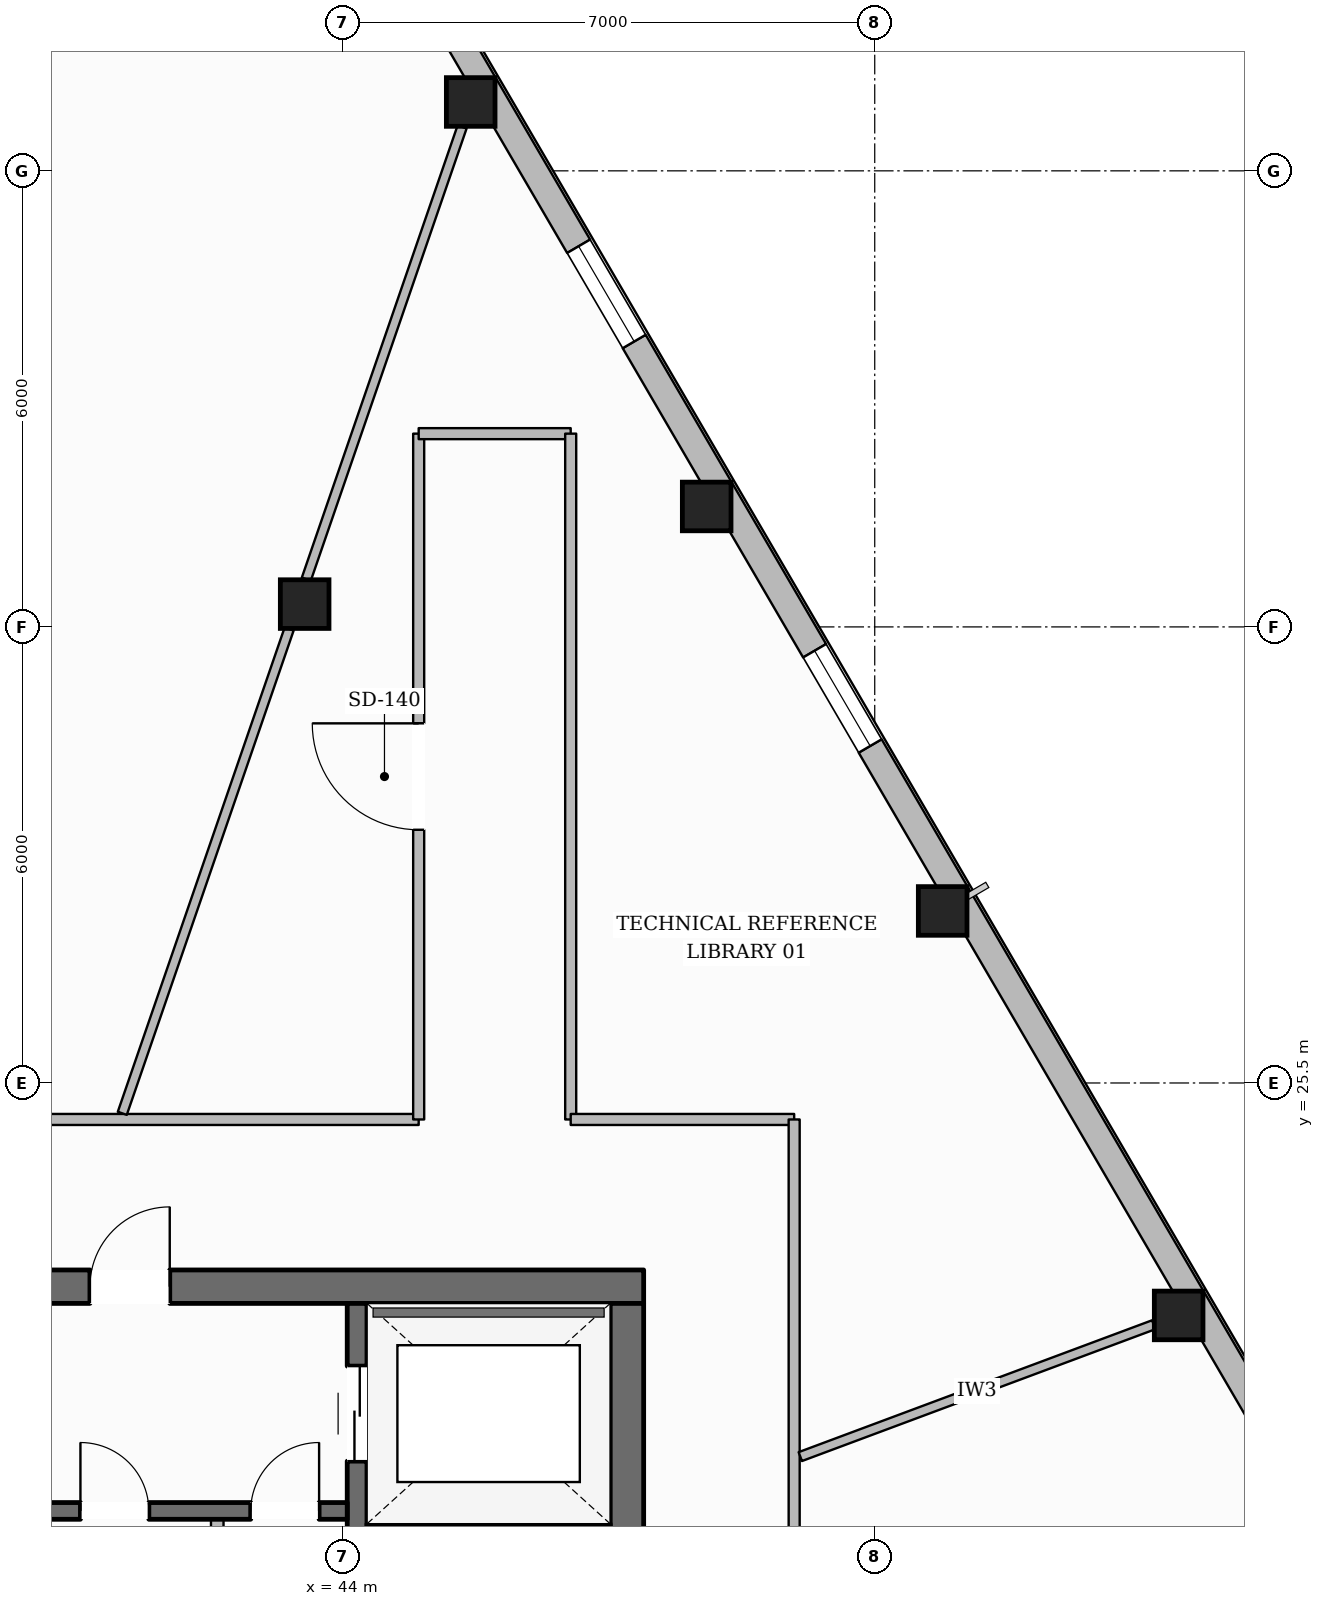
"""IFC4 building model, lengths in metres.
Left out: names, types, materials, properties, quantities, classifications, styles, units other than length and angle.
Written with IfcOpenShell. Run it as: python <this file> out.ifc"""

import sys

from ifc_helpers import new_model, si_unit, direction, frame, frame_2d, origin, origin_2d, place, context, subcontext, project, spatial, rectangle, hollow_rectangle, extrude, element, fill, save


model = new_model("IFC4")
c1 = context("Model", 3, precision=1e-05, world=origin(), true_north=direction((0.0, 1.0)))
c2 = subcontext(c1, "Body", "Model", "MODEL_VIEW")
j1 = project(units=[si_unit("LENGTHUNIT", "METRE"), si_unit("PLANEANGLEUNIT", "RADIAN")], contexts=[c1])
p1 = place(None, origin())
s1 = spatial("IfcSite", under=j1, at=p1, CompositionType="ELEMENT")
p2 = place(p1, origin())
s2 = spatial("IfcBuilding", under=s1, at=p2, CompositionType="ELEMENT")
p3 = place(p2, frame((0.0, 0.0, 184.25)))
s3 = spatial("IfcBuildingStorey", under=s2, at=p3, CompositionType="ELEMENT", Elevation=184.25)
p4 = place(p3, frame((28.04, 22.82, 0.0), z_axis=(0.0, 0.0, 1.0), x_axis=(1.0, 0.0, 0.0)))
e1 = element("IfcWall", 1, at=p4, inside=s3, PredefinedType="SOLIDWALL", context=c2, shape_type="SweptSolid", body=[
    extrude(rectangle(XDim=19.92, YDim=0.44, at=frame_2d((9.96, 0.0))), origin(), (0.0, 0.0, 1.0), 3.6),
])
p5 = place(p4, frame((6.235, 0.0, 0.0)))
e2 = element("IfcOpeningElement", 2, at=p5, cuts=e1, PredefinedType="OPENING", context=c2, shape_type="SweptSolid", body=[
    extrude(rectangle(XDim=1.05, YDim=2.15, at=frame_2d((0.525, 1.075))), frame((0.0, 0.23, 0.0), z_axis=(0.0, -1.0, 0.0), x_axis=(1.0, 0.0, 0.0)), (0.0, 0.0, 1.0), 0.46),
])
p6 = place(p4, frame((12.635, 0.0, 0.0)))
e3 = element("IfcOpeningElement", 3, at=p6, cuts=e1, PredefinedType="OPENING", context=c2, shape_type="SweptSolid", body=[
    extrude(rectangle(XDim=1.05, YDim=2.15, at=frame_2d((0.525, 1.075))), frame((0.0, 0.23, 0.0), z_axis=(0.0, -1.0, 0.0), x_axis=(1.0, 0.0, 0.0)), (0.0, 0.0, 1.0), 0.46),
])
p7 = place(p3, frame((47.74, 9.6, 0.0), z_axis=(0.0, 0.0, 1.0), x_axis=(0.0, 1.0, 0.0)))
e4 = element("IfcWall", 4, at=p7, inside=s3, PredefinedType="SOLIDWALL", context=c2, shape_type="SweptSolid", body=[
    extrude(rectangle(XDim=13.0, YDim=0.44, at=frame_2d((6.5, 0.0))), origin(), (0.0, 0.0, 1.0), 3.6),
])
p8 = place(p7, frame((0.2, 0.0, 0.0)))
e5 = element("IfcOpeningElement", 5, at=p8, cuts=e4, PredefinedType="OPENING", context=c2, shape_type="SweptSolid", body=[
    extrude(rectangle(XDim=1.1, YDim=2.15, at=frame_2d((0.55, 1.075))), frame((0.0, 0.23, 0.0), z_axis=(0.0, -1.0, 0.0), x_axis=(1.0, 0.0, 0.0)), (0.0, 0.0, 1.0), 0.46),
])
p9 = place(p7, frame((8.4, 0.0, 0.0)))
e6 = element("IfcOpeningElement", 6, at=p9, cuts=e4, PredefinedType="OPENING", context=c2, shape_type="SweptSolid", body=[
    extrude(rectangle(XDim=0.9, YDim=2.1, at=frame_2d((0.45, 1.05))), frame((0.0, 0.23, 0.0), z_axis=(0.0, -1.0, 0.0), x_axis=(1.0, 0.0, 0.0)), (0.0, 0.0, 1.0), 0.46),
])
p10 = place(p3, frame((44.19, 9.6, 0.0), z_axis=(0.0, 0.0, 1.0), x_axis=(0.0, 1.0, 0.0)))
e7 = element("IfcWall", 7, at=p10, inside=s3, PredefinedType="SHEAR", context=c2, shape_type="SweptSolid", body=[
    extrude(rectangle(XDim=13.0, YDim=0.26, at=frame_2d((6.5, 0.0))), origin(), (0.0, 0.0, 1.0), 3.6),
])
p11 = place(p10, frame((10.925, 0.0, 0.0)))
e8 = element("IfcOpeningElement", 8, at=p11, cuts=e7, PredefinedType="OPENING", context=c2, shape_type="SweptSolid", body=[
    extrude(rectangle(XDim=1.25, YDim=2.25, at=frame_2d((0.625, 1.125))), frame((0.0, 0.14, 0.0), z_axis=(0.0, -1.0, 0.0), x_axis=(1.0, 0.0, 0.0)), (0.0, 0.0, 1.0), 0.28),
])
p12 = place(p3, frame((44.32, 19.57, 0.0), z_axis=(0.0, 0.0, 1.0), x_axis=(1.0, 0.0, 0.0)))
e9 = element("IfcWall", 9, at=p12, inside=s3, PredefinedType="SHEAR", context=c2, shape_type="SweptSolid", body=[
    extrude(rectangle(XDim=3.2, YDim=0.26, at=frame_2d((1.6, 0.0))), origin(), (0.0, 0.0, 1.0), 3.6),
])
p13 = place(p3, frame((31.94, 19.87, 0.0), z_axis=(0.0, 0.0, 1.0), x_axis=(1.0, 0.0, 0.0)))
e10 = element("IfcWall", 10, at=p13, inside=s3, PredefinedType="SOLIDWALL", context=c2, shape_type="SweptSolid", body=[
    extrude(rectangle(XDim=12.12, YDim=0.22, at=frame_2d((6.06, 0.0))), origin(), (0.0, 0.0, 1.0), 3.6),
])
p14 = place(p13, frame((6.3, 0.0, 0.0)))
e11 = element("IfcOpeningElement", 11, at=p14, cuts=e10, PredefinedType="OPENING", context=c2, shape_type="SweptSolid", body=[
    extrude(rectangle(XDim=1.1, YDim=2.15, at=frame_2d((0.55, 1.075))), frame((0.0, 0.12, 0.0), z_axis=(0.0, -1.0, 0.0), x_axis=(1.0, 0.0, 0.0)), (0.0, 0.0, 1.0), 0.24),
])
p15 = place(p13, frame((8.61, 0.0, 0.0)))
e12 = element("IfcOpeningElement", 12, at=p15, cuts=e10, PredefinedType="OPENING", context=c2, shape_type="SweptSolid", body=[
    extrude(rectangle(XDim=0.9, YDim=2.1, at=frame_2d((0.45, 1.05))), frame((0.0, 0.12, 0.0), z_axis=(0.0, -1.0, 0.0), x_axis=(1.0, 0.0, 0.0)), (0.0, 0.0, 1.0), 0.24),
])
p16 = place(p13, frame((10.85, 0.0, 0.0)))
e13 = element("IfcOpeningElement", 13, at=p16, cuts=e10, PredefinedType="OPENING", context=c2, shape_type="SweptSolid", body=[
    extrude(rectangle(XDim=0.9, YDim=2.1, at=frame_2d((0.45, 1.05))), frame((0.0, 0.12, 0.0), z_axis=(0.0, -1.0, 0.0), x_axis=(1.0, 0.0, 0.0)), (0.0, 0.0, 1.0), 0.24),
])
for number, where, z_axis, x_axis in (
    (14, (54.998, 22.442, 0.0), (0.0, 0.0, 1.0), (1.0, 0.0, 0.0)),
    (15, (51.894, 27.763, 0.0), (0.0, 0.0, 1.0), (1.0, 0.0, 0.0)),
    (16, (48.789, 33.085, 0.0), (0.0, 0.0, 1.0), (1.0, 0.0, 0.0)),
    (17, (45.684, 38.406, 0.0), (0.0, 0.0, 1.0), (1.0, 0.0, 0.0)),
    (18, (43.5, 31.8, 0.0), (0.0, 0.0, 1.0), (1.0, 0.0, 0.0)),
):
    element("IfcColumn", number, at=place(p3, frame(where, z_axis=z_axis, x_axis=x_axis)), inside=s3, PredefinedType="COLUMN", context=c2, shape_type="SweptSolid", body=[
        extrude(hollow_rectangle(XDim=0.64, YDim=0.64, WallThickness=0.028, at=origin_2d()), origin(), (0.0, 0.0, 1.0), 3.6),
    ])
p17 = place(p3, frame((42.575, 44.272, 0.0), z_axis=(0.0, 0.0, 1.0), x_axis=(0.503934681705, -0.863741764982, 0.0)))
e19 = element("IfcWall", 19, at=p17, inside=s3, PredefinedType="STANDARD", context=c2, shape_type="SweptSolid", body=[
    extrude(rectangle(XDim=37.915, YDim=0.35, at=frame_2d((18.958, 0.0))), origin(), (0.0, 0.0, 1.0), 3.132),
])
p18 = place(p17, frame((33.633, 0.0, 0.65)))
e20 = element("IfcOpeningElement", 20, at=p18, cuts=e19, PredefinedType="OPENING", context=c2, shape_type="SweptSolid", body=[
    extrude(rectangle(XDim=1.45, YDim=1.75, at=frame_2d((0.725, 0.875))), frame((0.0, 0.185, 0.0), z_axis=(0.0, -1.0, 0.0), x_axis=(1.0, 0.0, 0.0)), (0.0, 0.0, 1.0), 0.37),
])
p19 = place(p17, frame((27.472, 0.0, 0.65)))
e21 = element("IfcOpeningElement", 21, at=p19, cuts=e19, PredefinedType="OPENING", context=c2, shape_type="SweptSolid", body=[
    extrude(rectangle(XDim=1.45, YDim=1.75, at=frame_2d((0.725, 0.875))), frame((0.0, 0.185, 0.0), z_axis=(0.0, -1.0, 0.0), x_axis=(1.0, 0.0, 0.0)), (0.0, 0.0, 1.0), 0.37),
])
p20 = place(p17, frame((15.15, 0.0, 0.65)))
e22 = element("IfcOpeningElement", 22, at=p20, cuts=e19, PredefinedType="OPENING", context=c2, shape_type="SweptSolid", body=[
    extrude(rectangle(XDim=1.45, YDim=1.75, at=frame_2d((0.725, 0.875))), frame((0.0, 0.185, 0.0), z_axis=(0.0, -1.0, 0.0), x_axis=(1.0, 0.0, 0.0)), (0.0, 0.0, 1.0), 0.37),
])
p21 = place(p17, frame((8.989, 0.0, 0.65)))
e23 = element("IfcOpeningElement", 23, at=p21, cuts=e19, PredefinedType="OPENING", context=c2, shape_type="SweptSolid", body=[
    extrude(rectangle(XDim=1.45, YDim=1.75, at=frame_2d((0.725, 0.875))), frame((0.0, 0.185, 0.0), z_axis=(0.0, -1.0, 0.0), x_axis=(1.0, 0.0, 0.0)), (0.0, 0.0, 1.0), 0.37),
])
p22 = place(p17, frame((2.828, 0.0, 0.65)))
e24 = element("IfcOpeningElement", 24, at=p22, cuts=e19, PredefinedType="OPENING", context=c2, shape_type="SweptSolid", body=[
    extrude(rectangle(XDim=1.45, YDim=1.75, at=frame_2d((0.725, 0.875))), frame((0.0, 0.185, 0.0), z_axis=(0.0, -1.0, 0.0), x_axis=(1.0, 0.0, 0.0)), (0.0, 0.0, 1.0), 0.37),
])
p23 = place(p3, frame((42.35, 16.56, 0.0), z_axis=(0.0, 0.0, 1.0), x_axis=(0.0, 1.0, 0.0)))
e25 = element("IfcWall", 25, at=p23, inside=s3, PredefinedType="PARTITIONING", context=c2, shape_type="SweptSolid", body=[
    extrude(rectangle(XDim=3.2, YDim=0.165, at=frame_2d((1.6, 0.0))), origin(), (0.0, 0.0, 1.0), 3.6),
])
p24 = place(p3, frame((31.0, 25.02, 0.0), z_axis=(0.0, 0.0, 1.0), x_axis=(1.0, 0.0, 0.0)))
e26 = element("IfcWall", 26, at=p24, inside=s3, PredefinedType="PARTITIONING", context=c2, shape_type="SweptSolid", body=[
    extrude(rectangle(XDim=14.0, YDim=0.145, at=frame_2d((7.0, 0.0))), origin(), (0.0, 0.0, 1.0), 3.6),
])
p25 = place(p24, frame((4.434, 0.0, 0.0)))
e27 = element("IfcOpeningElement", 27, at=p25, cuts=e26, PredefinedType="OPENING", context=c2, shape_type="SweptSolid", body=[
    extrude(rectangle(XDim=1.4, YDim=2.2, at=frame_2d((0.7, 1.1))), frame((0.0, 0.083, 0.0), z_axis=(0.0, -1.0, 0.0), x_axis=(1.0, 0.0, 0.0)), (0.0, 0.0, 1.0), 0.165),
])
p26 = place(p3, frame((45.0, 25.02, 0.0), z_axis=(0.0, 0.0, 1.0), x_axis=(0.0, 1.0, 0.0)))
e28 = element("IfcWall", 28, at=p26, inside=s3, PredefinedType="PARTITIONING", context=c2, shape_type="SweptSolid", body=[
    extrude(rectangle(XDim=9.022, YDim=0.145, at=frame_2d((4.511, 0.0))), origin(), (0.0, 0.0, 1.0), 3.6),
])
p27 = place(p26, frame((3.811, 0.0, 0.0)))
e29 = element("IfcOpeningElement", 29, at=p27, cuts=e28, PredefinedType="OPENING", context=c2, shape_type="SweptSolid", body=[
    extrude(rectangle(XDim=1.4, YDim=2.2, at=frame_2d((0.7, 1.1))), frame((0.0, 0.083, 0.0), z_axis=(0.0, -1.0, 0.0), x_axis=(1.0, 0.0, 0.0)), (0.0, 0.0, 1.0), 0.165),
])
p28 = place(p3, frame((45.0, 34.042, 0.0), z_axis=(0.0, 0.0, 1.0), x_axis=(1.0, 0.0, 0.0)))
e30 = element("IfcWall", 30, at=p28, inside=s3, PredefinedType="PARTITIONING", context=c2, shape_type="SweptSolid", body=[
    extrude(rectangle(XDim=2.0, YDim=0.145, at=frame_2d((1.0, 0.0))), origin(), (0.0, 0.0, 1.0), 3.6),
])
p29 = place(p3, frame((47.0, 34.042, 0.0), z_axis=(0.0, 0.0, 1.0), x_axis=(0.0, -1.0, 0.0)))
e31 = element("IfcWall", 31, at=p29, inside=s3, PredefinedType="PARTITIONING", context=c2, shape_type="SweptSolid", body=[
    extrude(rectangle(XDim=9.022, YDim=0.145, at=frame_2d((4.511, 0.0))), origin(), (0.0, 0.0, 1.0), 3.6),
])
p30 = place(p3, frame((47.0, 25.02, 0.0), z_axis=(0.0, 0.0, 1.0), x_axis=(1.0, 0.0, 0.0)))
e32 = element("IfcWall", 32, at=p30, inside=s3, PredefinedType="PARTITIONING", context=c2, shape_type="SweptSolid", body=[
    extrude(rectangle(XDim=2.94, YDim=0.145, at=frame_2d((1.47, 0.0))), origin(), (0.0, 0.0, 1.0), 3.6),
])
p31 = place(p3, frame((49.94, 25.02, 0.0), z_axis=(0.0, 0.0, 1.0), x_axis=(0.0, -1.0, 0.0)))
e33 = element("IfcWall", 33, at=p31, inside=s3, PredefinedType="PARTITIONING", context=c2, shape_type="SweptSolid", body=[
    extrude(rectangle(XDim=7.92, YDim=0.145, at=frame_2d((3.96, 0.0))), origin(), (0.0, 0.0, 1.0), 3.339),
])
p32 = place(p3, frame((50.021, 20.585, 0.0), z_axis=(0.0, 0.0, 1.0), x_axis=(0.936930245376, 0.349516402047, 0.0)))
e34 = element("IfcWall", 34, at=p32, inside=s3, PredefinedType="PARTITIONING", context=c2, shape_type="SweptSolid", body=[
    extrude(rectangle(XDim=4.963, YDim=0.125, at=frame_2d((2.481, 0.0))), origin(), (0.0, 0.0, 1.0), 3.6),
])
p33 = place(p3, frame((41.101, 25.101, 0.0), z_axis=(0.0, 0.0, 1.0), x_axis=(0.325732757855, 0.945461882077, 0.0)))
e35 = element("IfcWall", 35, at=p33, inside=s3, PredefinedType="PARTITIONING", context=c2, shape_type="SweptSolid", body=[
    extrude(rectangle(XDim=6.739, YDim=0.125, at=frame_2d((3.369, 0.0))), origin(), (0.0, 0.0, 1.0), 3.141),
])
p34 = place(p3, frame((43.521, 32.128, 0.0), z_axis=(0.0, 0.0, 1.0), x_axis=(0.325720467461, 0.945466116303, 0.0)))
e36 = element("IfcWall", 36, at=p34, inside=s3, PredefinedType="PARTITIONING", context=c2, shape_type="SweptSolid", body=[
    extrude(rectangle(XDim=6.293, YDim=0.125, at=frame_2d((3.146, 0.0))), origin(), (0.0, 0.0, 1.0), 3.6),
])
p35 = place(p20, origin())
e37 = element("IfcWindow", 37, at=p35, inside=s3, PartitioningType="SINGLE_PANEL", PredefinedType="WINDOW", context=c2, shape_type="SweptSolid", body=[
    extrude(rectangle(XDim=1.45, YDim=1.75, at=frame_2d((0.725, 0.875))), frame((0.0, 0.03, 0.0), z_axis=(0.0, -1.0, 0.0), x_axis=(1.0, 0.0, 0.0)), (0.0, 0.0, 1.0), 0.06),
])
fill(e22, e37)
p36 = place(p21, origin())
e38 = element("IfcWindow", 38, at=p36, inside=s3, PartitioningType="SINGLE_PANEL", PredefinedType="WINDOW", context=c2, shape_type="SweptSolid", body=[
    extrude(rectangle(XDim=1.45, YDim=1.75, at=frame_2d((0.725, 0.875))), frame((0.0, 0.03, 0.0), z_axis=(0.0, -1.0, 0.0), x_axis=(1.0, 0.0, 0.0)), (0.0, 0.0, 1.0), 0.06),
])
fill(e23, e38)
p37 = place(p6, origin())
e39 = element("IfcDoor", 39, at=p37, inside=s3, OperationType="SINGLE_SWING_RIGHT", PredefinedType="DOOR", context=c2, shape_type="SweptSolid", body=[
    extrude(rectangle(XDim=1.05, YDim=2.15, at=frame_2d((0.525, 1.075))), frame((0.0, 0.025, 0.0), z_axis=(0.0, -1.0, 0.0), x_axis=(1.0, 0.0, 0.0)), (0.0, 0.0, 1.0), 0.05),
])
fill(e3, e39)
p38 = place(p11, origin())
e40 = element("IfcDoor", 40, at=p38, inside=s3, OperationType="DOUBLE_DOOR_SLIDING", PredefinedType="DOOR", context=c2, shape_type="SweptSolid", body=[
    extrude(rectangle(XDim=1.25, YDim=2.25, at=frame_2d((0.625, 1.125))), frame((0.0, 0.025, 0.0), z_axis=(0.0, -1.0, 0.0), x_axis=(1.0, 0.0, 0.0)), (0.0, 0.0, 1.0), 0.05),
])
fill(e8, e40)
p39 = place(p15, origin())
e41 = element("IfcDoor", 41, at=p39, inside=s3, OperationType="SINGLE_SWING_LEFT", PredefinedType="DOOR", context=c2, shape_type="SweptSolid", body=[
    extrude(rectangle(XDim=0.9, YDim=2.1, at=frame_2d((0.45, 1.05))), frame((0.0, 0.025, 0.0), z_axis=(0.0, -1.0, 0.0), x_axis=(1.0, 0.0, 0.0)), (0.0, 0.0, 1.0), 0.05),
])
fill(e12, e41)
p40 = place(p16, origin())
e42 = element("IfcDoor", 42, at=p40, inside=s3, OperationType="SINGLE_SWING_RIGHT", PredefinedType="DOOR", context=c2, shape_type="SweptSolid", body=[
    extrude(rectangle(XDim=0.9, YDim=2.1, at=frame_2d((0.45, 1.05))), frame((0.0, 0.025, 0.0), z_axis=(0.0, -1.0, 0.0), x_axis=(1.0, 0.0, 0.0)), (0.0, 0.0, 1.0), 0.05),
])
fill(e13, e42)
p41 = place(p27, origin())
e43 = element("IfcDoor", 43, at=p41, inside=s3, OperationType="SINGLE_SWING_RIGHT", PredefinedType="DOOR", context=c2, shape_type="SweptSolid", body=[
    extrude(rectangle(XDim=1.4, YDim=2.2, at=frame_2d((0.7, 1.1))), frame((0.0, 0.025, 0.0), z_axis=(0.0, -1.0, 0.0), x_axis=(1.0, 0.0, 0.0)), (0.0, 0.0, 1.0), 0.05),
])
fill(e29, e43)
save(model, sys.argv[1])
